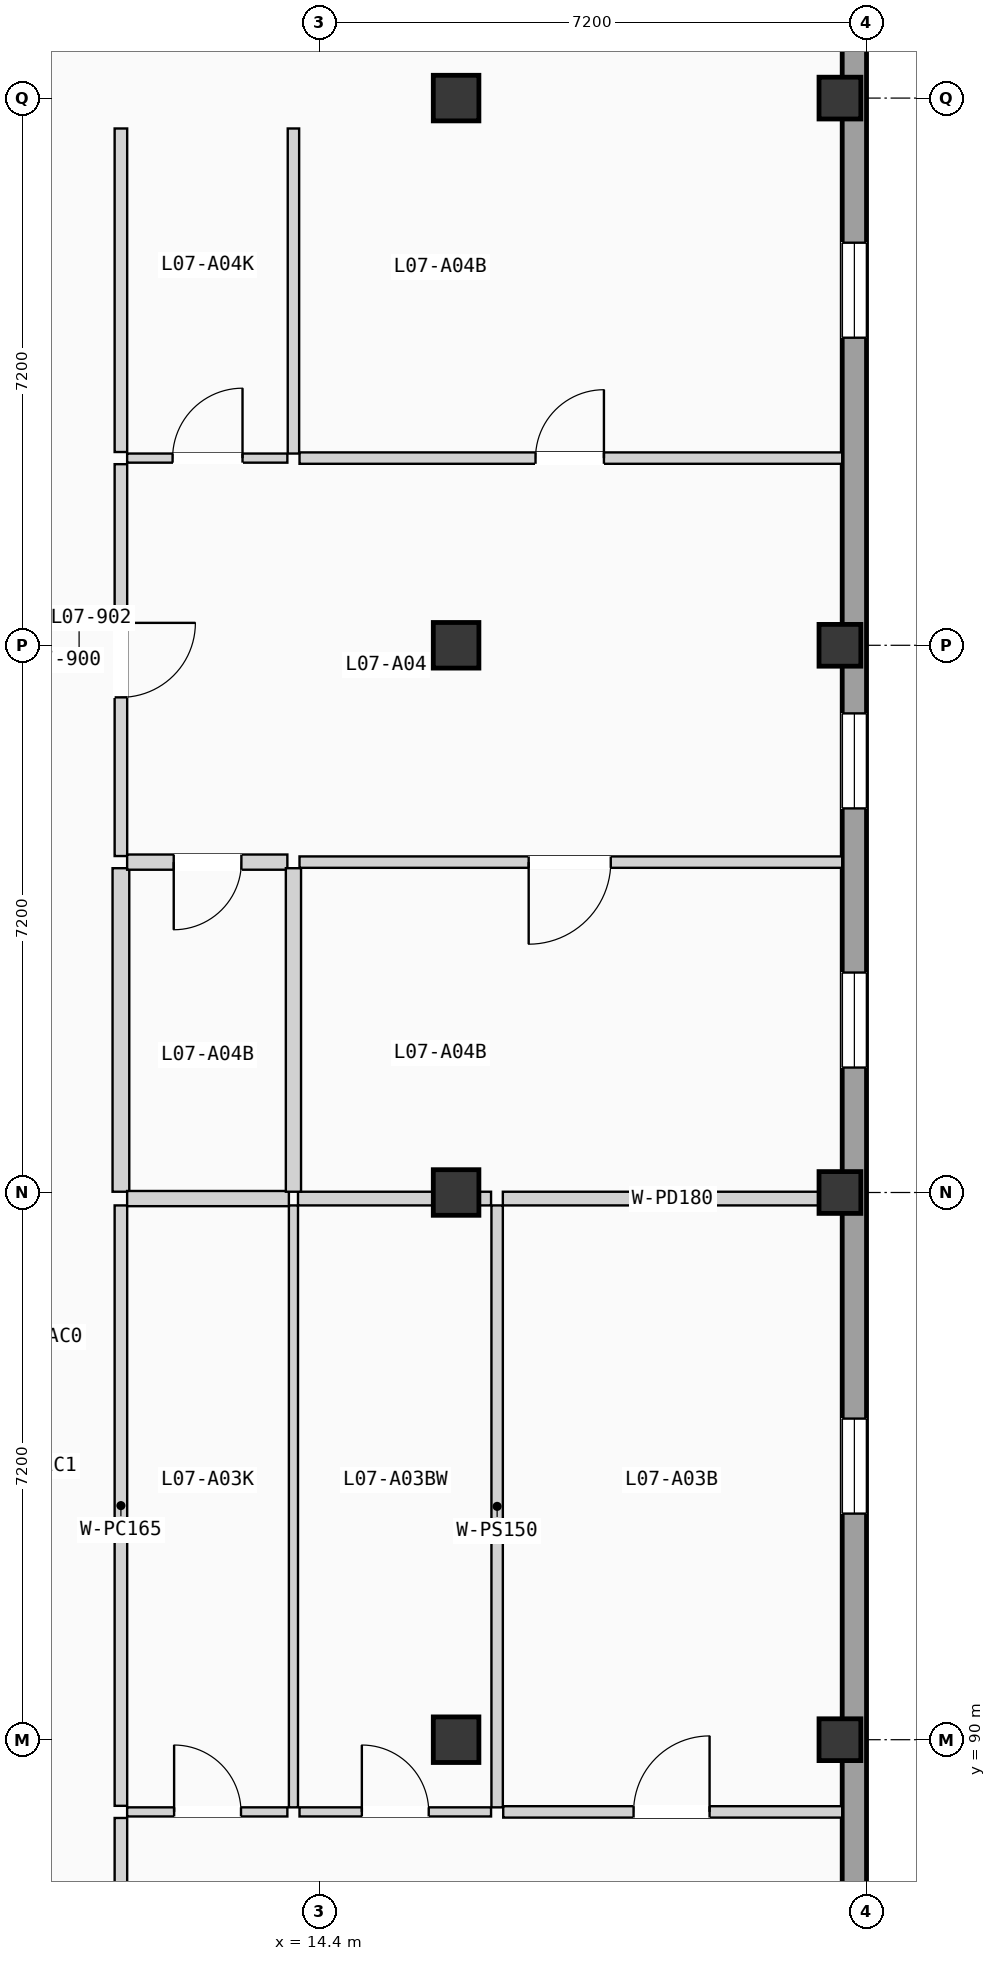
"""IFC4 building model, lengths in metres.
Left out: names, types, materials, properties, quantities, classifications, styles, units other than length and angle.
Written with IfcOpenShell. Run it as: python <this file> out.ifc"""

import sys

from ifc_helpers import new_model, si_unit, direction, frame, frame_2d, origin, origin_2d, place, context, subcontext, project, spatial, rectangle, extrude, element, fill, save


model = new_model("IFC4")
c1 = context("Model", 3, precision=1e-05, world=origin(), true_north=direction((0.0, 1.0)))
c2 = subcontext(c1, "Body", "Model", "MODEL_VIEW")
j1 = project(units=[si_unit("LENGTHUNIT", "METRE"), si_unit("PLANEANGLEUNIT", "RADIAN")], contexts=[c1])
p1 = place(None, origin())
s1 = spatial("IfcSite", under=j1, at=p1, CompositionType="ELEMENT")
p2 = place(p1, origin())
s2 = spatial("IfcBuilding", under=s1, at=p2, CompositionType="ELEMENT")
p3 = place(p2, frame((0.0, 0.0, 24.675)))
s3 = spatial("IfcBuildingStorey", under=s2, at=p3, CompositionType="ELEMENT", Elevation=24.675)
for number, where, z_axis, x_axis in (
    (1, (16.2, 90.0, 0.0), (0.0, 0.0, 1.0), (1.0, 0.0, 0.0)),
    (2, (16.2, 97.2, 0.0), (0.0, 0.0, 1.0), (1.0, 0.0, 0.0)),
    (3, (16.2, 104.4, 0.0), (0.0, 0.0, 1.0), (1.0, 0.0, 0.0)),
    (4, (16.2, 111.6, 0.0), (0.0, 0.0, 1.0), (1.0, 0.0, 0.0)),
):
    element("IfcColumn", number, at=place(p3, frame(where, z_axis=z_axis, x_axis=x_axis)), inside=s3, PredefinedType="COLUMN", context=c2, shape_type="SweptSolid", body=[
        extrude(rectangle(XDim=0.6, YDim=0.6, at=origin_2d()), origin(), (0.0, 0.0, 1.0), 3.15),
    ])
for number, where, z_axis, x_axis in (
    (5, (21.25, 90.0, 0.0), (0.0, 0.0, 1.0), (1.0, 0.0, 0.0)),
    (6, (21.25, 97.2, 0.0), (0.0, 0.0, 1.0), (1.0, 0.0, 0.0)),
    (7, (21.25, 104.4, 0.0), (0.0, 0.0, 1.0), (1.0, 0.0, 0.0)),
    (8, (21.25, 111.6, 0.0), (0.0, 0.0, 1.0), (1.0, 0.0, 0.0)),
):
    element("IfcColumn", number, at=place(p3, frame(where, z_axis=z_axis, x_axis=x_axis)), inside=s3, PredefinedType="COLUMN", context=c2, shape_type="SweptSolid", body=[
        extrude(rectangle(XDim=0.55, YDim=0.55, at=origin_2d()), origin(), (0.0, 0.0, 1.0), 3.15),
    ])
p4 = place(p3, frame((21.44, 68.72, 0.0), z_axis=(0.0, 0.0, 1.0), x_axis=(0.0, 1.0, 0.0)))
e9 = element("IfcWall", 9, at=p4, inside=s3, PredefinedType="SOLIDWALL", context=c2, shape_type="SweptSolid", body=[
    extrude(rectangle(XDim=49.76, YDim=0.32, at=frame_2d((24.88, 0.0))), origin(), (0.0, 0.0, 1.0), 2.9),
])
p5 = place(p4, frame((17.105, 0.0, 0.565)))
e10 = element("IfcOpeningElement", 10, at=p5, cuts=e9, PredefinedType="OPENING", context=c2, shape_type="SweptSolid", body=[
    extrude(rectangle(XDim=1.15, YDim=1.65, at=frame_2d((0.575, 0.825))), frame((0.0, 0.17, 0.0), z_axis=(0.0, -1.0, 0.0), x_axis=(1.0, 0.0, 0.0)), (0.0, 0.0, 1.0), 0.34),
])
p6 = place(p4, frame((10.07, 0.0, 0.85)))
e11 = element("IfcOpeningElement", 11, at=p6, cuts=e9, PredefinedType="OPENING", context=c2, shape_type="SweptSolid", body=[
    extrude(rectangle(XDim=0.95, YDim=1.2, at=frame_2d((0.475, 0.6))), frame((0.0, 0.17, 0.0), z_axis=(0.0, -1.0, 0.0), x_axis=(1.0, 0.0, 0.0)), (0.0, 0.0, 1.0), 0.34),
])
p7 = place(p4, frame((24.255, 0.0, 0.9)))
e12 = element("IfcOpeningElement", 12, at=p7, cuts=e9, PredefinedType="OPENING", context=c2, shape_type="SweptSolid", body=[
    extrude(rectangle(XDim=1.25, YDim=1.2, at=frame_2d((0.625, 0.6))), frame((0.0, 0.17, 0.0), z_axis=(0.0, -1.0, 0.0), x_axis=(1.0, 0.0, 0.0)), (0.0, 0.0, 1.0), 0.34),
])
p8 = place(p4, frame((33.534, 0.0, 0.865)))
e13 = element("IfcOpeningElement", 13, at=p8, cuts=e9, PredefinedType="OPENING", context=c2, shape_type="SweptSolid", body=[
    extrude(rectangle(XDim=1.25, YDim=1.35, at=frame_2d((0.625, 0.675))), frame((0.0, 0.17, 0.0), z_axis=(0.0, -1.0, 0.0), x_axis=(1.0, 0.0, 0.0)), (0.0, 0.0, 1.0), 0.34),
])
p9 = place(p4, frame((30.124, 0.0, 0.715)))
e14 = element("IfcOpeningElement", 14, at=p9, cuts=e9, PredefinedType="OPENING", context=c2, shape_type="SweptSolid", body=[
    extrude(rectangle(XDim=1.25, YDim=1.5, at=frame_2d((0.625, 0.75))), frame((0.0, 0.17, 0.0), z_axis=(0.0, -1.0, 0.0), x_axis=(1.0, 0.0, 0.0)), (0.0, 0.0, 1.0), 0.34),
])
p10 = place(p4, frame((39.727, 0.0, 0.565)))
e15 = element("IfcOpeningElement", 15, at=p10, cuts=e9, PredefinedType="OPENING", context=c2, shape_type="SweptSolid", body=[
    extrude(rectangle(XDim=1.25, YDim=1.65, at=frame_2d((0.625, 0.825))), frame((0.0, 0.17, 0.0), z_axis=(0.0, -1.0, 0.0), x_axis=(1.0, 0.0, 0.0)), (0.0, 0.0, 1.0), 0.34),
])
p11 = place(p3, frame((11.79, 83.83, 0.0), z_axis=(0.0, 0.0, 1.0), x_axis=(0.0, 1.0, 0.0)))
e16 = element("IfcWall", 16, at=p11, inside=s3, PredefinedType="PARTITIONING", context=c2, shape_type="SweptSolid", body=[
    extrude(rectangle(XDim=5.14, YDim=0.165, at=frame_2d((2.57, 0.0))), origin(), (0.0, 0.0, 1.0), 2.87),
])
p12 = place(p11, frame((2.08, 0.0, 0.0)))
e17 = element("IfcOpeningElement", 17, at=p12, cuts=e16, PredefinedType="OPENING", context=c2, shape_type="SweptSolid", body=[
    extrude(rectangle(XDim=0.98, YDim=2.08, at=frame_2d((0.49, 1.04))), frame((0.0, 0.093, 0.0), z_axis=(0.0, -1.0, 0.0), x_axis=(1.0, 0.0, 0.0)), (0.0, 0.0, 1.0), 0.185),
])
p13 = place(p3, frame((11.79, 89.13, 0.0), z_axis=(0.0, 0.0, 1.0), x_axis=(0.0, 1.0, 0.0)))
e18 = element("IfcWall", 18, at=p13, inside=s3, PredefinedType="PARTITIONING", context=c2, shape_type="SweptSolid", body=[
    extrude(rectangle(XDim=7.9, YDim=0.165, at=frame_2d((3.95, 0.0))), origin(), (0.0, 0.0, 1.0), 2.87),
])
p14 = place(p3, frame((11.79, 101.627, 0.0), z_axis=(0.0, 0.0, 1.0), x_axis=(0.0, 1.0, 0.0)))
e19 = element("IfcWall", 19, at=p14, inside=s3, PredefinedType="PARTITIONING", context=c2, shape_type="SweptSolid", body=[
    extrude(rectangle(XDim=5.156, YDim=0.165, at=frame_2d((2.578, 0.0))), origin(), (0.0, 0.0, 1.0), 2.87),
])
p15 = place(p14, frame((2.088, 0.0, 0.0)))
e20 = element("IfcOpeningElement", 20, at=p15, cuts=e19, PredefinedType="OPENING", context=c2, shape_type="SweptSolid", body=[
    extrude(rectangle(XDim=0.98, YDim=2.08, at=frame_2d((0.49, 1.04))), frame((0.0, 0.093, 0.0), z_axis=(0.0, -1.0, 0.0), x_axis=(1.0, 0.0, 0.0)), (0.0, 0.0, 1.0), 0.185),
])
p16 = place(p3, frame((11.79, 97.21, 0.0), z_axis=(0.0, 0.0, 1.0), x_axis=(0.0, 1.0, 0.0)))
e21 = element("IfcWall", 21, at=p16, inside=s3, PredefinedType="PLUMBINGWALL", context=c2, shape_type="SweptSolid", body=[
    extrude(rectangle(XDim=4.257, YDim=0.22, at=frame_2d((2.128, 0.0))), origin(), (0.0, 0.0, 1.0), 2.87),
])
p17 = place(p3, frame((11.79, 106.943, 0.0), z_axis=(0.0, 0.0, 1.0), x_axis=(0.0, 1.0, 0.0)))
e22 = element("IfcWall", 22, at=p17, inside=s3, PredefinedType="PARTITIONING", context=c2, shape_type="SweptSolid", body=[
    extrude(rectangle(XDim=4.257, YDim=0.165, at=frame_2d((2.128, 0.0))), origin(), (0.0, 0.0, 1.0), 2.87),
])
p18 = place(p3, frame((11.872, 89.05, 0.0), z_axis=(0.0, 0.0, 1.0), x_axis=(1.0, 0.0, 0.0)))
e23 = element("IfcWall", 23, at=p18, inside=s3, PredefinedType="PARTITIONING", context=c2, shape_type="SweptSolid", body=[
    extrude(rectangle(XDim=2.108, YDim=0.12, at=frame_2d((1.054, 0.0))), origin(), (0.0, 0.0, 1.0), 2.87),
])
p19 = place(p18, frame((0.618, 0.0, 0.0)))
e24 = element("IfcOpeningElement", 24, at=p19, cuts=e23, PredefinedType="OPENING", context=c2, shape_type="SweptSolid", body=[
    extrude(rectangle(XDim=0.88, YDim=2.02, at=frame_2d((0.44, 1.01))), frame((0.0, 0.07, 0.0), z_axis=(0.0, -1.0, 0.0), x_axis=(1.0, 0.0, 0.0)), (0.0, 0.0, 1.0), 0.14),
])
p20 = place(p3, frame((16.82, 89.05, 0.0), z_axis=(0.0, 0.0, 1.0), x_axis=(1.0, 0.0, 0.0)))
e25 = element("IfcWall", 25, at=p20, inside=s3, PredefinedType="PARTITIONING", context=c2, shape_type="SweptSolid", body=[
    extrude(rectangle(XDim=4.46, YDim=0.15, at=frame_2d((2.23, 0.0))), origin(), (0.0, 0.0, 1.0), 2.87),
])
p21 = place(p20, frame((1.715, 0.0, 0.0)))
e26 = element("IfcOpeningElement", 26, at=p21, cuts=e25, PredefinedType="OPENING", context=c2, shape_type="SweptSolid", body=[
    extrude(rectangle(XDim=1.0, YDim=2.06, at=frame_2d((0.5, 1.03))), frame((0.0, 0.085, 0.0), z_axis=(0.0, -1.0, 0.0), x_axis=(1.0, 0.0, 0.0)), (0.0, 0.0, 1.0), 0.17),
])
p22 = place(p3, frame((14.14, 89.05, 0.0), z_axis=(0.0, 0.0, 1.0), x_axis=(1.0, 0.0, 0.0)))
e27 = element("IfcWall", 27, at=p22, inside=s3, PredefinedType="PARTITIONING", context=c2, shape_type="SweptSolid", body=[
    extrude(rectangle(XDim=2.52, YDim=0.12, at=frame_2d((1.26, 0.0))), origin(), (0.0, 0.0, 1.0), 2.87),
])
p23 = place(p22, frame((0.82, 0.0, 0.0)))
e28 = element("IfcOpeningElement", 28, at=p23, cuts=e27, PredefinedType="OPENING", context=c2, shape_type="SweptSolid", body=[
    extrude(rectangle(XDim=0.88, YDim=2.02, at=frame_2d((0.44, 1.01))), frame((0.0, 0.07, 0.0), z_axis=(0.0, -1.0, 0.0), x_axis=(1.0, 0.0, 0.0)), (0.0, 0.0, 1.0), 0.14),
])
p24 = place(p3, frame((14.06, 89.11, 0.0), z_axis=(0.0, 0.0, 1.0), x_axis=(0.0, 1.0, 0.0)))
e29 = element("IfcWall", 29, at=p24, inside=s3, PredefinedType="PARTITIONING", context=c2, shape_type="SweptSolid", body=[
    extrude(rectangle(XDim=7.92, YDim=0.12, at=frame_2d((3.96, 0.0))), origin(), (0.0, 0.0, 1.0), 2.87),
])
p25 = place(p3, frame((11.872, 97.12, 0.0), z_axis=(0.0, 0.0, 1.0), x_axis=(1.0, 0.0, 0.0)))
e30 = element("IfcWall", 30, at=p25, inside=s3, PredefinedType="PLUMBINGWALL", context=c2, shape_type="SweptSolid", body=[
    extrude(rectangle(XDim=2.128, YDim=0.2, at=frame_2d((1.064, 0.0))), origin(), (0.0, 0.0, 1.0), 2.17),
])
p26 = place(p3, frame((16.74, 89.11, 0.0), z_axis=(0.0, 0.0, 1.0), x_axis=(0.0, 1.0, 0.0)))
e31 = element("IfcWall", 31, at=p26, inside=s3, PredefinedType="PARTITIONING", context=c2, shape_type="SweptSolid", body=[
    extrude(rectangle(XDim=7.92, YDim=0.15, at=frame_2d((3.96, 0.0))), origin(), (0.0, 0.0, 1.0), 2.87),
])
p27 = place(p3, frame((16.815, 97.12, 0.0), z_axis=(0.0, 0.0, 1.0), x_axis=(1.0, 0.0, 0.0)))
e32 = element("IfcWall", 32, at=p27, inside=s3, PredefinedType="PARTITIONING", context=c2, shape_type="SweptSolid", body=[
    extrude(rectangle(XDim=4.465, YDim=0.18, at=frame_2d((2.232, 0.0))), origin(), (0.0, 0.0, 1.0), 2.22),
])
p28 = place(p3, frame((14.12, 97.12, 0.0), z_axis=(0.0, 0.0, 1.0), x_axis=(1.0, 0.0, 0.0)))
e33 = element("IfcWall", 33, at=p28, inside=s3, PredefinedType="PARTITIONING", context=c2, shape_type="SweptSolid", body=[
    extrude(rectangle(XDim=2.54, YDim=0.18, at=frame_2d((1.27, 0.0))), origin(), (0.0, 0.0, 1.0), 2.17),
])
p29 = place(p3, frame((11.872, 101.547, 0.0), z_axis=(0.0, 0.0, 1.0), x_axis=(1.0, 0.0, 0.0)))
e34 = element("IfcWall", 34, at=p29, inside=s3, PredefinedType="PLUMBINGWALL", context=c2, shape_type="SweptSolid", body=[
    extrude(rectangle(XDim=2.108, YDim=0.2, at=frame_2d((1.054, 0.0))), origin(), (0.0, 0.0, 1.0), 2.87),
])
p30 = place(p29, frame((0.613, 0.0, 0.0)))
e35 = element("IfcOpeningElement", 35, at=p30, cuts=e34, PredefinedType="OPENING", context=c2, shape_type="SweptSolid", body=[
    extrude(rectangle(XDim=0.89, YDim=2.03, at=frame_2d((0.445, 1.015))), frame((0.0, 0.11, 0.0), z_axis=(0.0, -1.0, 0.0), x_axis=(1.0, 0.0, 0.0)), (0.0, 0.0, 1.0), 0.22),
])
p31 = place(p3, frame((11.872, 106.863, 0.0), z_axis=(0.0, 0.0, 1.0), x_axis=(1.0, 0.0, 0.0)))
e36 = element("IfcWall", 36, at=p31, inside=s3, PredefinedType="PARTITIONING", context=c2, shape_type="SweptSolid", body=[
    extrude(rectangle(XDim=2.108, YDim=0.12, at=frame_2d((1.054, 0.0))), origin(), (0.0, 0.0, 1.0), 2.87),
])
p32 = place(p31, frame((0.598, 0.0, 0.0)))
e37 = element("IfcOpeningElement", 37, at=p32, cuts=e36, PredefinedType="OPENING", context=c2, shape_type="SweptSolid", body=[
    extrude(rectangle(XDim=0.92, YDim=2.02, at=frame_2d((0.46, 1.01))), frame((0.0, 0.07, 0.0), z_axis=(0.0, -1.0, 0.0), x_axis=(1.0, 0.0, 0.0)), (0.0, 0.0, 1.0), 0.14),
])
p33 = place(p3, frame((14.14, 101.547, 0.0), z_axis=(0.0, 0.0, 1.0), x_axis=(1.0, 0.0, 0.0)))
e38 = element("IfcWall", 38, at=p33, inside=s3, PredefinedType="PARTITIONING", context=c2, shape_type="SweptSolid", body=[
    extrude(rectangle(XDim=7.14, YDim=0.15, at=frame_2d((3.57, 0.0))), origin(), (0.0, 0.0, 1.0), 2.87),
])
p34 = place(p33, frame((3.015, 0.0, 0.0)))
e39 = element("IfcOpeningElement", 39, at=p34, cuts=e38, PredefinedType="OPENING", context=c2, shape_type="SweptSolid", body=[
    extrude(rectangle(XDim=1.08, YDim=2.1, at=frame_2d((0.54, 1.05))), frame((0.0, 0.085, 0.0), z_axis=(0.0, -1.0, 0.0), x_axis=(1.0, 0.0, 0.0)), (0.0, 0.0, 1.0), 0.17),
])
p35 = place(p3, frame((14.14, 106.863, 0.0), z_axis=(0.0, 0.0, 1.0), x_axis=(1.0, 0.0, 0.0)))
e40 = element("IfcWall", 40, at=p35, inside=s3, PredefinedType="PARTITIONING", context=c2, shape_type="SweptSolid", body=[
    extrude(rectangle(XDim=7.14, YDim=0.15, at=frame_2d((3.57, 0.0))), origin(), (0.0, 0.0, 1.0), 2.87),
])
p36 = place(p35, frame((3.105, 0.0, 0.0)))
e41 = element("IfcOpeningElement", 41, at=p36, cuts=e40, PredefinedType="OPENING", context=c2, shape_type="SweptSolid", body=[
    extrude(rectangle(XDim=0.9, YDim=2.04, at=frame_2d((0.45, 1.02))), frame((0.0, 0.085, 0.0), z_axis=(0.0, -1.0, 0.0), x_axis=(1.0, 0.0, 0.0)), (0.0, 0.0, 1.0), 0.17),
])
p37 = place(p3, frame((14.06, 97.21, 0.0), z_axis=(0.0, 0.0, 1.0), x_axis=(0.0, 1.0, 0.0)))
e42 = element("IfcWall", 42, at=p37, inside=s3, PredefinedType="PLUMBINGWALL", context=c2, shape_type="SweptSolid", body=[
    extrude(rectangle(XDim=4.257, YDim=0.2, at=frame_2d((2.128, 0.0))), origin(), (0.0, 0.0, 1.0), 2.87),
])
p38 = place(p3, frame((14.06, 106.923, 0.0), z_axis=(0.0, 0.0, 1.0), x_axis=(0.0, 1.0, 0.0)))
e43 = element("IfcWall", 43, at=p38, inside=s3, PredefinedType="PARTITIONING", context=c2, shape_type="SweptSolid", body=[
    extrude(rectangle(XDim=4.277, YDim=0.15, at=frame_2d((2.138, 0.0))), origin(), (0.0, 0.0, 1.0), 2.87),
])
p39 = place(p7, origin())
e44 = element("IfcWindow", 44, at=p39, inside=s3, PartitioningType="SINGLE_PANEL", PredefinedType="WINDOW", context=c2, shape_type="SweptSolid", body=[
    extrude(rectangle(XDim=1.25, YDim=1.2, at=frame_2d((0.625, 0.6))), frame((0.0, 0.03, 0.0), z_axis=(0.0, -1.0, 0.0), x_axis=(1.0, 0.0, 0.0)), (0.0, 0.0, 1.0), 0.06),
])
fill(e12, e44)
p40 = place(p8, origin())
e45 = element("IfcWindow", 45, at=p40, inside=s3, PartitioningType="SINGLE_PANEL", PredefinedType="WINDOW", context=c2, shape_type="SweptSolid", body=[
    extrude(rectangle(XDim=1.25, YDim=1.35, at=frame_2d((0.625, 0.675))), frame((0.0, 0.03, 0.0), z_axis=(0.0, -1.0, 0.0), x_axis=(1.0, 0.0, 0.0)), (0.0, 0.0, 1.0), 0.06),
])
fill(e13, e45)
p41 = place(p9, origin())
e46 = element("IfcWindow", 46, at=p41, inside=s3, PartitioningType="SINGLE_PANEL", PredefinedType="WINDOW", context=c2, shape_type="SweptSolid", body=[
    extrude(rectangle(XDim=1.25, YDim=1.5, at=frame_2d((0.625, 0.75))), frame((0.0, 0.03, 0.0), z_axis=(0.0, -1.0, 0.0), x_axis=(1.0, 0.0, 0.0)), (0.0, 0.0, 1.0), 0.06),
])
fill(e14, e46)
p42 = place(p10, origin())
e47 = element("IfcWindow", 47, at=p42, inside=s3, PartitioningType="SINGLE_PANEL", PredefinedType="WINDOW", context=c2, shape_type="SweptSolid", body=[
    extrude(rectangle(XDim=1.25, YDim=1.65, at=frame_2d((0.625, 0.825))), frame((0.0, 0.03, 0.0), z_axis=(0.0, -1.0, 0.0), x_axis=(1.0, 0.0, 0.0)), (0.0, 0.0, 1.0), 0.06),
])
fill(e15, e47)
p43 = place(p15, frame((0.98, 0.0, 0.0), z_axis=(0.0, 0.0, 1.0), x_axis=(-1.0, 0.0, 0.0)))
e48 = element("IfcDoor", 48, at=p43, inside=s3, OperationType="SINGLE_SWING_RIGHT", PredefinedType="DOOR", context=c2, shape_type="SweptSolid", body=[
    extrude(rectangle(XDim=0.98, YDim=2.08, at=frame_2d((0.49, 1.04))), frame((0.0, 0.025, 0.0), z_axis=(0.0, -1.0, 0.0), x_axis=(1.0, 0.0, 0.0)), (0.0, 0.0, 1.0), 0.05),
])
fill(e20, e48)
p44 = place(p19, origin())
e49 = element("IfcDoor", 49, at=p44, inside=s3, OperationType="SINGLE_SWING_LEFT", PredefinedType="DOOR", context=c2, shape_type="SweptSolid", body=[
    extrude(rectangle(XDim=0.88, YDim=2.02, at=frame_2d((0.44, 1.01))), frame((0.0, 0.025, 0.0), z_axis=(0.0, -1.0, 0.0), x_axis=(1.0, 0.0, 0.0)), (0.0, 0.0, 1.0), 0.05),
])
fill(e24, e49)
p45 = place(p21, origin())
e50 = element("IfcDoor", 50, at=p45, inside=s3, OperationType="SINGLE_SWING_RIGHT", PredefinedType="DOOR", context=c2, shape_type="SweptSolid", body=[
    extrude(rectangle(XDim=1.0, YDim=2.06, at=frame_2d((0.5, 1.03))), frame((0.0, 0.025, 0.0), z_axis=(0.0, -1.0, 0.0), x_axis=(1.0, 0.0, 0.0)), (0.0, 0.0, 1.0), 0.05),
])
fill(e26, e50)
p46 = place(p23, origin())
e51 = element("IfcDoor", 51, at=p46, inside=s3, OperationType="SINGLE_SWING_LEFT", PredefinedType="DOOR", context=c2, shape_type="SweptSolid", body=[
    extrude(rectangle(XDim=0.88, YDim=2.02, at=frame_2d((0.44, 1.01))), frame((0.0, 0.025, 0.0), z_axis=(0.0, -1.0, 0.0), x_axis=(1.0, 0.0, 0.0)), (0.0, 0.0, 1.0), 0.05),
])
fill(e28, e51)
p47 = place(p30, frame((0.89, 0.0, 0.0), z_axis=(0.0, 0.0, 1.0), x_axis=(-1.0, 0.0, 0.0)))
e52 = element("IfcDoor", 52, at=p47, inside=s3, OperationType="SINGLE_SWING_LEFT", PredefinedType="DOOR", context=c2, shape_type="SweptSolid", body=[
    extrude(rectangle(XDim=0.89, YDim=2.03, at=frame_2d((0.445, 1.015))), frame((0.0, 0.025, 0.0), z_axis=(0.0, -1.0, 0.0), x_axis=(1.0, 0.0, 0.0)), (0.0, 0.0, 1.0), 0.05),
])
fill(e35, e52)
p48 = place(p32, origin())
e53 = element("IfcDoor", 53, at=p48, inside=s3, OperationType="SINGLE_SWING_RIGHT", PredefinedType="DOOR", context=c2, shape_type="SweptSolid", body=[
    extrude(rectangle(XDim=0.92, YDim=2.02, at=frame_2d((0.46, 1.01))), frame((0.0, 0.025, 0.0), z_axis=(0.0, -1.0, 0.0), x_axis=(1.0, 0.0, 0.0)), (0.0, 0.0, 1.0), 0.05),
])
fill(e37, e53)
p49 = place(p34, frame((1.08, 0.0, 0.0), z_axis=(0.0, 0.0, 1.0), x_axis=(-1.0, 0.0, 0.0)))
e54 = element("IfcDoor", 54, at=p49, inside=s3, OperationType="SINGLE_SWING_LEFT", PredefinedType="DOOR", context=c2, shape_type="SweptSolid", body=[
    extrude(rectangle(XDim=1.08, YDim=2.1, at=frame_2d((0.54, 1.05))), frame((0.0, 0.025, 0.0), z_axis=(0.0, -1.0, 0.0), x_axis=(1.0, 0.0, 0.0)), (0.0, 0.0, 1.0), 0.05),
])
fill(e39, e54)
p50 = place(p36, origin())
e55 = element("IfcDoor", 55, at=p50, inside=s3, OperationType="SINGLE_SWING_RIGHT", PredefinedType="DOOR", context=c2, shape_type="SweptSolid", body=[
    extrude(rectangle(XDim=0.9, YDim=2.04, at=frame_2d((0.45, 1.02))), frame((0.0, 0.025, 0.0), z_axis=(0.0, -1.0, 0.0), x_axis=(1.0, 0.0, 0.0)), (0.0, 0.0, 1.0), 0.05),
])
fill(e41, e55)
save(model, sys.argv[1])
